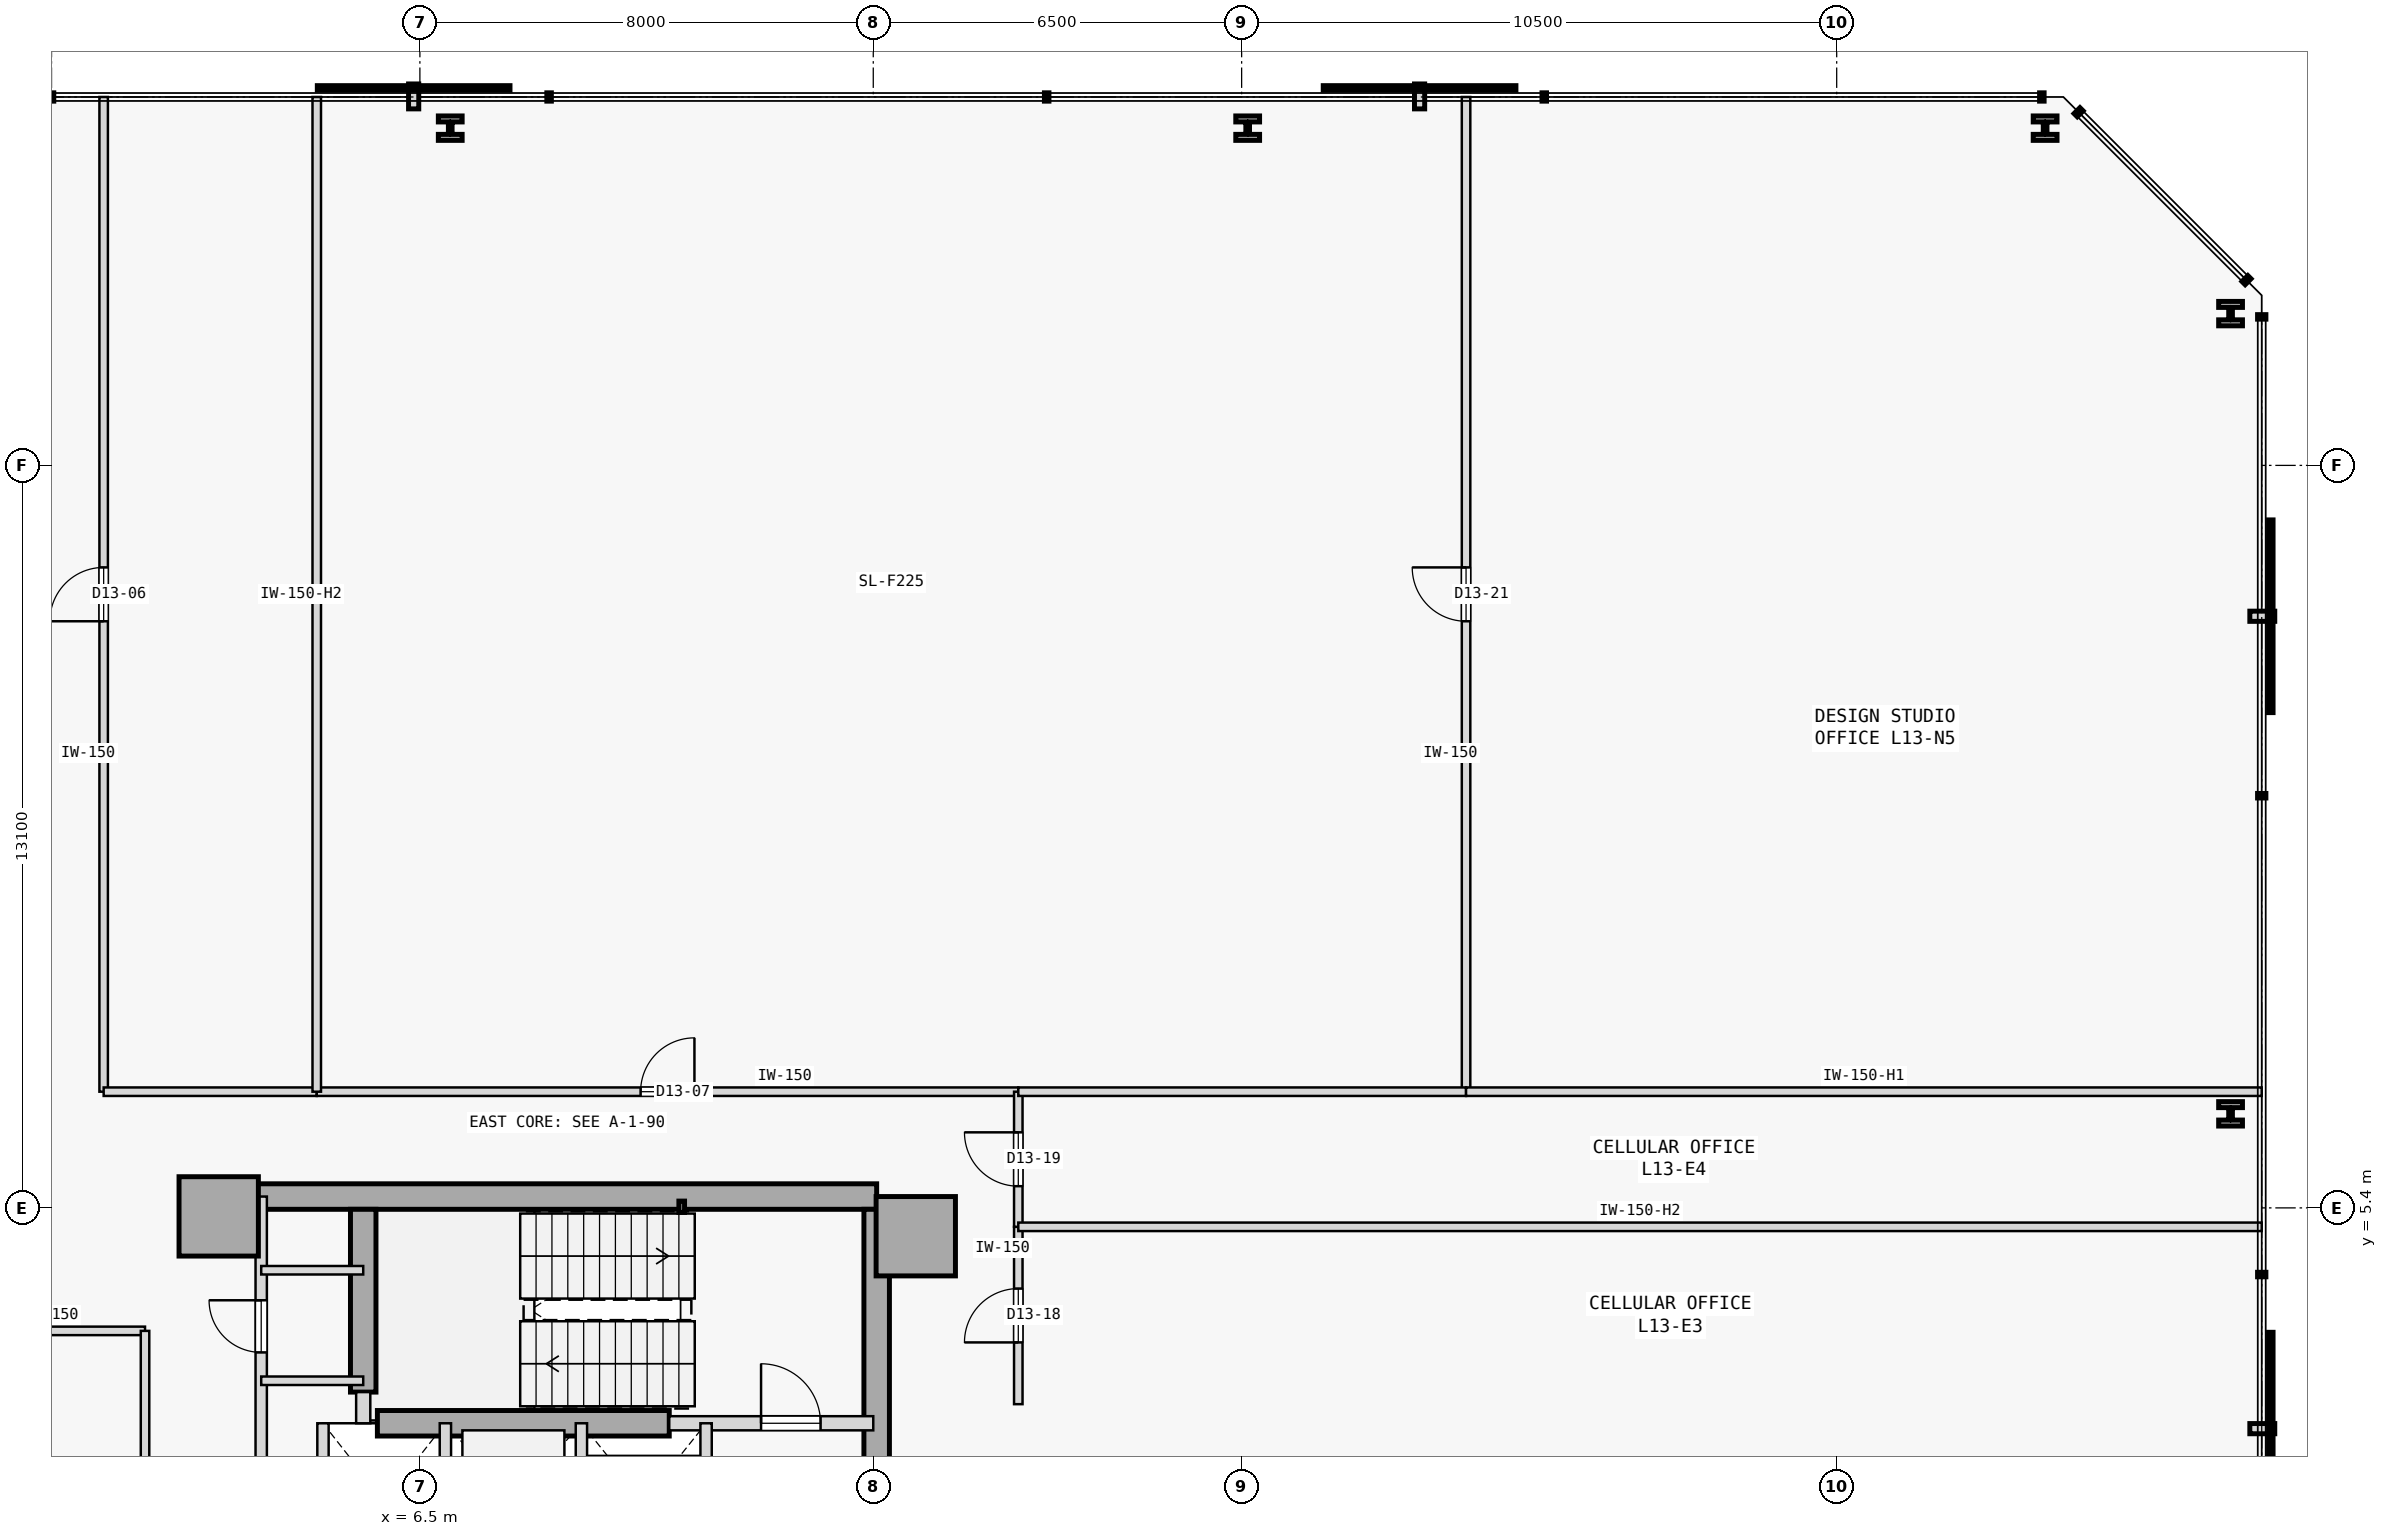
"""IFC4 building model, lengths in metres.
Left out: names, types, materials, properties, quantities, classifications, styles, units other than length and angle.
Written with IfcOpenShell. Run it as: python <this file> out.ifc"""

import sys

from ifc_helpers import new_model, si_unit, direction, frame, frame_2d, origin, origin_2d, place, context, subcontext, project, spatial, rectangle, hollow_rectangle, i_section, extrude, element, fill, save


model = new_model("IFC4")
c1 = context("Model", 3, precision=1e-05, world=origin(), true_north=direction((0.0, 1.0)))
c2 = subcontext(c1, "Body", "Model", "MODEL_VIEW")
j1 = project(units=[si_unit("LENGTHUNIT", "METRE"), si_unit("PLANEANGLEUNIT", "RADIAN")], contexts=[c1])
p1 = place(None, origin())
s1 = spatial("IfcSite", under=j1, at=p1, CompositionType="ELEMENT")
p2 = place(p1, origin())
s2 = spatial("IfcBuilding", under=s1, at=p2, CompositionType="ELEMENT")
p3 = place(p2, frame((0.0, 0.0, 56.0)))
s3 = spatial("IfcBuildingStorey", under=s2, at=p3, CompositionType="ELEMENT", Elevation=56.0)
for number, where, z_axis, x_axis in (
    (1, (15.25, 4.9, 0.0), (0.0, 0.0, 1.0), (1.0, 0.0, 0.0)),
    (2, (2.95, 5.25, 0.0), (0.0, 0.0, 1.0), (1.0, 0.0, 0.0)),
):
    element("IfcColumn", number, at=place(p3, frame(where, z_axis=z_axis, x_axis=x_axis)), inside=s3, PredefinedType="COLUMN", context=c2, shape_type="SweptSolid", body=[
        extrude(rectangle(XDim=1.4, YDim=1.4, at=origin_2d()), origin(), (0.0, 0.0, 1.0), 3.8),
    ])
p4 = place(p3, frame((3.15, 5.6, 0.0), z_axis=(0.0, 0.0, 1.0), x_axis=(1.0, 0.0, 0.0)))
e3 = element("IfcWall", 3, at=p4, inside=s3, PredefinedType="SHEAR", context=c2, shape_type="SweptSolid", body=[
    extrude(rectangle(XDim=11.41, YDim=0.45, at=frame_2d((5.705, 0.0))), origin(), (0.0, 0.0, 1.0), 3.575),
])
p5 = place(p3, frame((14.56, -5.375, 0.0), z_axis=(0.0, 0.0, 1.0), x_axis=(0.0, 1.0, 0.0)))
e4 = element("IfcWall", 4, at=p5, inside=s3, PredefinedType="SHEAR", context=c2, shape_type="SweptSolid", body=[
    extrude(rectangle(XDim=10.75, YDim=0.45, at=frame_2d((5.375, 0.0))), origin(), (0.0, 0.0, 1.0), 3.575),
])
p6 = place(p3, frame((5.5, 2.15, 0.0), z_axis=(0.0, 0.0, 1.0), x_axis=(0.0, 1.0, 0.0)))
e5 = element("IfcWall", 5, at=p6, inside=s3, PredefinedType="SHEAR", context=c2, shape_type="SweptSolid", body=[
    extrude(rectangle(XDim=3.225, YDim=0.45, at=frame_2d((1.613, 0.0))), origin(), (0.0, 0.0, 1.0), 3.575),
])
p7 = place(p3, frame((5.75, 1.6, 0.0), z_axis=(0.0, 0.0, 1.0), x_axis=(1.0, 0.0, 0.0)))
e6 = element("IfcWall", 6, at=p7, inside=s3, PredefinedType="SHEAR", context=c2, shape_type="SweptSolid", body=[
    extrude(rectangle(XDim=5.15, YDim=0.45, at=frame_2d((2.575, 0.0))), origin(), (0.0, 0.0, 1.0), 3.575),
])
p8 = place(p3, frame((11.12, 5.42, 0.0), z_axis=(0.0, 0.0, 1.0), x_axis=(1.0, 0.0, 0.0)))
e7 = element("IfcColumn", 7, at=p8, inside=s3, PredefinedType="COLUMN", context=c2, shape_type="SweptSolid", body=[
    extrude(hollow_rectangle(XDim=0.1, YDim=0.2, WallThickness=0.008, at=origin_2d()), origin(), (0.0, 0.0, 1.0), 3.8),
])
for number, where, z_axis, x_axis in (
    (8, (38.45, 7.059, 0.0), (0.0, 0.0, 1.0), (1.0, 0.0, 0.0)),
    (9, (38.45, 21.178, 0.0), (0.0, 0.0, 1.0), (1.0, 0.0, 0.0)),
    (10, (35.178, 24.45, 0.0), (0.0, 0.0, 1.0), (1.0, 0.0, 0.0)),
    (11, (21.107, 24.45, 0.0), (0.0, 0.0, 1.0), (1.0, 0.0, 0.0)),
    (12, (7.036, 24.45, 0.0), (0.0, 0.0, 1.0), (1.0, 0.0, 0.0)),
):
    element("IfcColumn", number, at=place(p3, frame(where, z_axis=z_axis, x_axis=x_axis)), inside=s3, PredefinedType="COLUMN", context=c2, shape_type="SweptSolid", body=[
        extrude(i_section(OverallWidth=0.42, OverallDepth=0.431, WebThickness=0.065, FlangeThickness=0.106, FilletRadius=0.015, at=origin_2d()), origin(), (0.0, 0.0, 1.0), 3.8),
    ])
p9 = place(p3, frame((10.9, 1.6, 0.0), z_axis=(0.0, 0.0, 1.0), x_axis=(1.0, 0.0, 0.0)))
e13 = element("IfcWall", 13, at=p9, inside=s3, PredefinedType="STANDARD", context=c2, shape_type="SweptSolid", body=[
    extrude(rectangle(XDim=3.6, YDim=0.25, at=frame_2d((1.8, 0.0))), origin(), (0.0, 0.0, 1.0), 3.575),
])
p10 = place(p9, frame((1.62, 0.0, 0.0)))
e14 = element("IfcOpeningElement", 14, at=p10, cuts=e13, PredefinedType="OPENING", context=c2, shape_type="SweptSolid", body=[
    extrude(rectangle(XDim=1.05, YDim=2.15, at=frame_2d((0.525, 1.075))), frame((0.0, 0.135, 0.0), z_axis=(0.0, -1.0, 0.0), x_axis=(1.0, 0.0, 0.0)), (0.0, 0.0, 1.0), 0.27),
])
p11 = place(p3, frame((5.5, 1.6, 0.0), z_axis=(0.0, 0.0, 1.0), x_axis=(0.0, 1.0, 0.0)))
e15 = element("IfcWall", 15, at=p11, inside=s3, PredefinedType="STANDARD", context=c2, shape_type="SweptSolid", body=[
    extrude(rectangle(XDim=0.55, YDim=0.25, at=frame_2d((0.275, 0.0))), origin(), (0.0, 0.0, 1.0), 3.575),
])
p12 = place(p3, frame((3.7, -1.15, 0.0), z_axis=(0.0, 0.0, 1.0), x_axis=(0.0, 1.0, 0.0)))
e16 = element("IfcWall", 16, at=p12, inside=s3, PredefinedType="STANDARD", context=c2, shape_type="SweptSolid", body=[
    extrude(rectangle(XDim=6.75, YDim=0.2, at=frame_2d((3.375, 0.0))), origin(), (0.0, 0.0, 1.0), 3.575),
])
p13 = place(p12, frame((1.1, 0.0, 0.0)))
e17 = element("IfcOpeningElement", 17, at=p13, cuts=e16, PredefinedType="OPENING", context=c2, shape_type="SweptSolid", body=[
    extrude(rectangle(XDim=0.9, YDim=2.15, at=frame_2d((0.45, 1.075))), frame((0.0, 0.11, 0.0), z_axis=(0.0, -1.0, 0.0), x_axis=(1.0, 0.0, 0.0)), (0.0, 0.0, 1.0), 0.22),
])
p14 = place(p12, frame((4.0, 0.0, 0.0)))
e18 = element("IfcOpeningElement", 18, at=p14, cuts=e16, PredefinedType="OPENING", context=c2, shape_type="SweptSolid", body=[
    extrude(rectangle(XDim=0.92, YDim=2.15, at=frame_2d((0.46, 1.075))), frame((0.0, 0.11, 0.0), z_axis=(0.0, -1.0, 0.0), x_axis=(1.0, 0.0, 0.0)), (0.0, 0.0, 1.0), 0.22),
])
p15 = place(p3, frame((11.55, -1.15, 0.0), z_axis=(0.0, 0.0, 1.0), x_axis=(0.0, 1.0, 0.0)))
e19 = element("IfcWall", 19, at=p15, inside=s3, PredefinedType="STANDARD", context=c2, shape_type="SweptSolid", body=[
    extrude(rectangle(XDim=2.75, YDim=0.2, at=frame_2d((1.375, 0.0))), origin(), (0.0, 0.0, 1.0), 3.575),
])
p16 = place(p15, frame((0.825, 0.0, 0.0)))
e20 = element("IfcOpeningElement", 20, at=p16, cuts=e19, PredefinedType="OPENING", context=c2, shape_type="SweptSolid", body=[
    extrude(rectangle(XDim=1.1, YDim=2.15, at=frame_2d((0.55, 1.075))), frame((0.0, 0.11, 0.0), z_axis=(0.0, -1.0, 0.0), x_axis=(1.0, 0.0, 0.0)), (0.0, 0.0, 1.0), 0.22),
])
for number, where, z_axis, x_axis in (
    (21, (9.35, -1.15, 0.0), (0.0, 0.0, 1.0), (0.0, 1.0, 0.0)),
    (22, (6.95, -1.15, 0.0), (0.0, 0.0, 1.0), (0.0, 1.0, 0.0)),
    (23, (4.79, -1.15, 0.0), (0.0, 0.0, 1.0), (0.0, 1.0, 0.0)),
):
    element("IfcWall", number, at=place(p3, frame(where, z_axis=z_axis, x_axis=x_axis)), inside=s3, PredefinedType="STANDARD", context=c2, shape_type="SweptSolid", body=[
        extrude(rectangle(XDim=2.75, YDim=0.2, at=frame_2d((1.375, 0.0))), origin(), (0.0, 0.0, 1.0), 3.575),
    ])
for number, where, z_axis, x_axis in (
    (24, (3.7, 4.3, 0.0), (0.0, 0.0, 1.0), (1.0, 0.0, 0.0)),
    (25, (3.7, 2.35, 0.0), (0.0, 0.0, 1.0), (1.0, 0.0, 0.0)),
):
    element("IfcWall", number, at=place(p3, frame(where, z_axis=z_axis, x_axis=x_axis)), inside=s3, PredefinedType="PARTITIONING", context=c2, shape_type="SweptSolid", body=[
        extrude(rectangle(XDim=1.8, YDim=0.15, at=frame_2d((0.9, 0.0))), origin(), (0.0, 0.0, 1.0), 3.575),
    ])
p17 = place(p3, frame((-1.65, 3.23, 0.0), z_axis=(0.0, 0.0, 1.0), x_axis=(1.0, 0.0, 0.0)))
e26 = element("IfcWall", 26, at=p17, inside=s3, PredefinedType="PARTITIONING", context=c2, shape_type="SweptSolid", body=[
    extrude(rectangle(XDim=3.3, YDim=0.15, at=frame_2d((1.65, 0.0))), origin(), (0.0, 0.0, 1.0), 3.575),
])
p18 = place(p3, frame((1.65, -3.23, 0.0), z_axis=(0.0, 0.0, 1.0), x_axis=(0.0, 1.0, 0.0)))
e27 = element("IfcWall", 27, at=p18, inside=s3, PredefinedType="PARTITIONING", context=c2, shape_type="SweptSolid", body=[
    extrude(rectangle(XDim=6.46, YDim=0.15, at=frame_2d((3.23, 0.0))), origin(), (0.0, 0.0, 1.0), 3.575),
])
p19 = place(p3, frame((0.92, 7.45, 0.0), z_axis=(0.0, 0.0, 1.0), x_axis=(0.0, 1.0, 0.0)))
e28 = element("IfcWall", 28, at=p19, inside=s3, PredefinedType="PARTITIONING", context=c2, shape_type="SweptSolid", body=[
    extrude(rectangle(XDim=17.55, YDim=0.15, at=frame_2d((8.775, 0.0))), origin(), (0.0, 0.0, 1.0), 3.575),
])
p20 = place(p19, frame((8.3, 0.0, 0.0)))
e29 = element("IfcOpeningElement", 29, at=p20, cuts=e28, PredefinedType="OPENING", context=c2, shape_type="SweptSolid", body=[
    extrude(rectangle(XDim=0.95, YDim=2.15, at=frame_2d((0.475, 1.075))), frame((0.0, 0.085, 0.0), z_axis=(0.0, -1.0, 0.0), x_axis=(1.0, 0.0, 0.0)), (0.0, 0.0, 1.0), 0.17),
])
p21 = place(p3, frame((0.92, 7.45, 0.0), z_axis=(0.0, 0.0, 1.0), x_axis=(1.0, 0.0, 0.0)))
e30 = element("IfcWall", 30, at=p21, inside=s3, PredefinedType="PARTITIONING", context=c2, shape_type="SweptSolid", body=[
    extrude(rectangle(XDim=3.76, YDim=0.15, at=frame_2d((1.88, 0.0))), origin(), (0.0, 0.0, 1.0), 3.575),
])
p22 = place(p3, frame((4.68, 7.45, 0.0), z_axis=(0.0, 0.0, 1.0), x_axis=(1.0, 0.0, 0.0)))
e31 = element("IfcWall", 31, at=p22, inside=s3, PredefinedType="PARTITIONING", context=c2, shape_type="SweptSolid", body=[
    extrude(rectangle(XDim=12.379, YDim=0.15, at=frame_2d((6.189, 0.0))), origin(), (0.0, 0.0, 1.0), 3.575),
])
p23 = place(p22, frame((5.715, 0.0, 0.0)))
e32 = element("IfcOpeningElement", 32, at=p23, cuts=e31, PredefinedType="OPENING", context=c2, shape_type="SweptSolid", body=[
    extrude(rectangle(XDim=0.95, YDim=2.15, at=frame_2d((0.475, 1.075))), frame((0.0, 0.085, 0.0), z_axis=(0.0, -1.0, 0.0), x_axis=(1.0, 0.0, 0.0)), (0.0, 0.0, 1.0), 0.17),
])
p24 = place(p3, frame((17.059, 1.937, 0.0), z_axis=(0.0, 0.0, 1.0), x_axis=(0.0, 1.0, 0.0)))
e33 = element("IfcWall", 33, at=p24, inside=s3, PredefinedType="PARTITIONING", context=c2, shape_type="SweptSolid", body=[
    extrude(rectangle(XDim=3.129, YDim=0.15, at=frame_2d((1.564, 0.0))), origin(), (0.0, 0.0, 1.0), 3.575),
])
p25 = place(p24, frame((1.09, 0.0, 0.0)))
e34 = element("IfcOpeningElement", 34, at=p25, cuts=e33, PredefinedType="OPENING", context=c2, shape_type="SweptSolid", body=[
    extrude(rectangle(XDim=0.95, YDim=2.15, at=frame_2d((0.475, 1.075))), frame((0.0, 0.085, 0.0), z_axis=(0.0, -1.0, 0.0), x_axis=(1.0, 0.0, 0.0)), (0.0, 0.0, 1.0), 0.17),
])
p26 = place(p3, frame((17.059, 5.066, 0.0), z_axis=(0.0, 0.0, 1.0), x_axis=(0.0, 1.0, 0.0)))
e35 = element("IfcWall", 35, at=p26, inside=s3, PredefinedType="PARTITIONING", context=c2, shape_type="SweptSolid", body=[
    extrude(rectangle(XDim=2.384, YDim=0.15, at=frame_2d((1.192, 0.0))), origin(), (0.0, 0.0, 1.0), 3.575),
])
p27 = place(p26, frame((0.717, 0.0, 0.0)))
e36 = element("IfcOpeningElement", 36, at=p27, cuts=e35, PredefinedType="OPENING", context=c2, shape_type="SweptSolid", body=[
    extrude(rectangle(XDim=0.95, YDim=2.15, at=frame_2d((0.475, 1.075))), frame((0.0, 0.085, 0.0), z_axis=(0.0, -1.0, 0.0), x_axis=(1.0, 0.0, 0.0)), (0.0, 0.0, 1.0), 0.17),
])
p28 = place(p3, frame((4.68, 7.45, 0.0), z_axis=(0.0, 0.0, 1.0), x_axis=(0.0, 1.0, 0.0)))
e37 = element("IfcWall", 37, at=p28, inside=s3, PredefinedType="PARTITIONING", context=c2, shape_type="SweptSolid", body=[
    extrude(rectangle(XDim=17.55, YDim=0.15, at=frame_2d((8.775, 0.0))), origin(), (0.0, 0.0, 1.0), 2.975),
])
p29 = place(p3, frame((24.96, 7.45, 0.0), z_axis=(0.0, 0.0, 1.0), x_axis=(0.0, 1.0, 0.0)))
e38 = element("IfcWall", 38, at=p29, inside=s3, PredefinedType="PARTITIONING", context=c2, shape_type="SweptSolid", body=[
    extrude(rectangle(XDim=17.55, YDim=0.15, at=frame_2d((8.775, 0.0))), origin(), (0.0, 0.0, 1.0), 3.575),
])
p30 = place(p29, frame((8.3, 0.0, 0.0)))
e39 = element("IfcOpeningElement", 39, at=p30, cuts=e38, PredefinedType="OPENING", context=c2, shape_type="SweptSolid", body=[
    extrude(rectangle(XDim=0.95, YDim=2.15, at=frame_2d((0.475, 1.075))), frame((0.0, 0.085, 0.0), z_axis=(0.0, -1.0, 0.0), x_axis=(1.0, 0.0, 0.0)), (0.0, 0.0, 1.0), 0.17),
])
p31 = place(p3, frame((17.059, 7.45, 0.0), z_axis=(0.0, 0.0, 1.0), x_axis=(1.0, 0.0, 0.0)))
e40 = element("IfcWall", 40, at=p31, inside=s3, PredefinedType="PARTITIONING", context=c2, shape_type="SweptSolid", body=[
    extrude(rectangle(XDim=7.901, YDim=0.15, at=frame_2d((3.95, 0.0))), origin(), (0.0, 0.0, 1.0), 3.575),
])
p32 = place(p3, frame((24.96, 7.45, 0.0), z_axis=(0.0, 0.0, 1.0), x_axis=(1.0, 0.0, 0.0)))
e41 = element("IfcWall", 41, at=p32, inside=s3, PredefinedType="PARTITIONING", context=c2, shape_type="SweptSolid", body=[
    extrude(rectangle(XDim=14.04, YDim=0.15, at=frame_2d((7.02, 0.0))), origin(), (0.0, 0.0, 1.0), 3.125),
])
p33 = place(p3, frame((17.059, 5.066, 0.0), z_axis=(0.0, 0.0, 1.0), x_axis=(1.0, 0.0, 0.0)))
e42 = element("IfcWall", 42, at=p33, inside=s3, PredefinedType="PARTITIONING", context=c2, shape_type="SweptSolid", body=[
    extrude(rectangle(XDim=21.941, YDim=0.15, at=frame_2d((10.97, 0.0))), origin(), (0.0, 0.0, 1.0), 2.975),
])
p34 = place(p10, origin())
e43 = element("IfcDoor", 43, at=p34, inside=s3, OperationType="SINGLE_SWING_LEFT", PredefinedType="DOOR", context=c2, shape_type="SweptSolid", body=[
    extrude(rectangle(XDim=1.05, YDim=2.15, at=frame_2d((0.525, 1.075))), frame((0.0, 0.025, 0.0), z_axis=(0.0, -1.0, 0.0), x_axis=(1.0, 0.0, 0.0)), (0.0, 0.0, 1.0), 0.05),
])
fill(e14, e43)
p35 = place(p14, origin())
e44 = element("IfcDoor", 44, at=p35, inside=s3, OperationType="SINGLE_SWING_RIGHT", PredefinedType="DOOR", context=c2, shape_type="SweptSolid", body=[
    extrude(rectangle(XDim=0.92, YDim=2.15, at=frame_2d((0.46, 1.075))), frame((0.0, 0.025, 0.0), z_axis=(0.0, -1.0, 0.0), x_axis=(1.0, 0.0, 0.0)), (0.0, 0.0, 1.0), 0.05),
])
fill(e18, e44)
p36 = place(p20, origin())
e45 = element("IfcDoor", 45, at=p36, inside=s3, OperationType="SINGLE_SWING_LEFT", PredefinedType="DOOR", context=c2, shape_type="SweptSolid", body=[
    extrude(rectangle(XDim=0.95, YDim=2.15, at=frame_2d((0.475, 1.075))), frame((0.0, 0.025, 0.0), z_axis=(0.0, -1.0, 0.0), x_axis=(1.0, 0.0, 0.0)), (0.0, 0.0, 1.0), 0.05),
])
fill(e29, e45)
p37 = place(p23, origin())
e46 = element("IfcDoor", 46, at=p37, inside=s3, OperationType="SINGLE_SWING_RIGHT", PredefinedType="DOOR", context=c2, shape_type="SweptSolid", body=[
    extrude(rectangle(XDim=0.95, YDim=2.15, at=frame_2d((0.475, 1.075))), frame((0.0, 0.025, 0.0), z_axis=(0.0, -1.0, 0.0), x_axis=(1.0, 0.0, 0.0)), (0.0, 0.0, 1.0), 0.05),
])
fill(e32, e46)
p38 = place(p25, origin())
e47 = element("IfcDoor", 47, at=p38, inside=s3, OperationType="SINGLE_SWING_LEFT", PredefinedType="DOOR", context=c2, shape_type="SweptSolid", body=[
    extrude(rectangle(XDim=0.95, YDim=2.15, at=frame_2d((0.475, 1.075))), frame((0.0, 0.025, 0.0), z_axis=(0.0, -1.0, 0.0), x_axis=(1.0, 0.0, 0.0)), (0.0, 0.0, 1.0), 0.05),
])
fill(e34, e47)
p39 = place(p27, origin())
e48 = element("IfcDoor", 48, at=p39, inside=s3, OperationType="SINGLE_SWING_RIGHT", PredefinedType="DOOR", context=c2, shape_type="SweptSolid", body=[
    extrude(rectangle(XDim=0.95, YDim=2.15, at=frame_2d((0.475, 1.075))), frame((0.0, 0.025, 0.0), z_axis=(0.0, -1.0, 0.0), x_axis=(1.0, 0.0, 0.0)), (0.0, 0.0, 1.0), 0.05),
])
fill(e36, e48)
p40 = place(p30, origin())
e49 = element("IfcDoor", 49, at=p40, inside=s3, OperationType="SINGLE_SWING_RIGHT", PredefinedType="DOOR", context=c2, shape_type="SweptSolid", body=[
    extrude(rectangle(XDim=0.95, YDim=2.15, at=frame_2d((0.475, 1.075))), frame((0.0, 0.025, 0.0), z_axis=(0.0, -1.0, 0.0), x_axis=(1.0, 0.0, 0.0)), (0.0, 0.0, 1.0), 0.05),
])
fill(e39, e49)
save(model, sys.argv[1])
